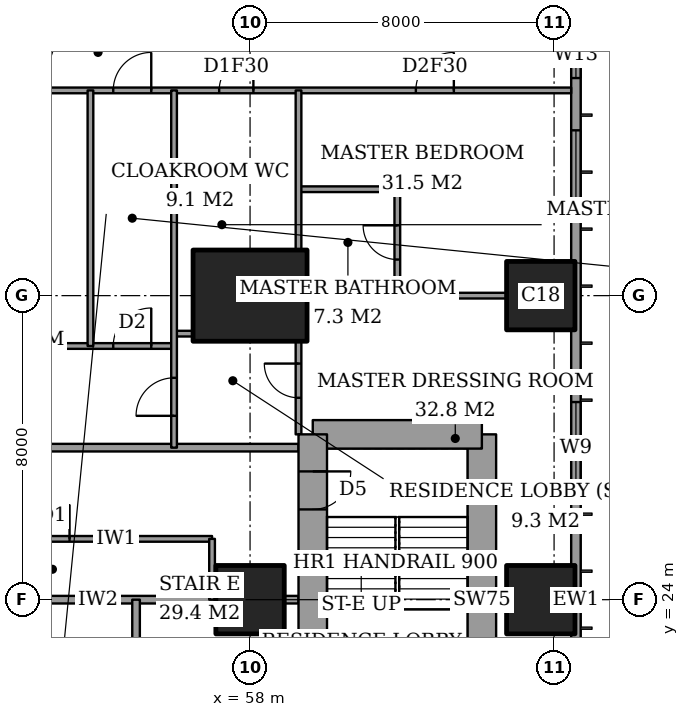
"""IFC4 building model, lengths in metres.
Left out: names, types, materials, properties, quantities, classifications, styles, units other than length and angle.
Written with IfcOpenShell. Run it as: python <this file> out.ifc"""

import sys

from ifc_helpers import new_model, si_unit, direction, frame, frame_2d, origin, origin_2d, place, context, subcontext, project, spatial, rectangle, extrude, element, fill, save


model = new_model("IFC4")
c1 = context("Model", 3, precision=1e-05, world=origin(), true_north=direction((0.0, 1.0)))
c2 = subcontext(c1, "Body", "Model", "MODEL_VIEW")
j1 = project(units=[si_unit("LENGTHUNIT", "METRE"), si_unit("PLANEANGLEUNIT", "RADIAN")], contexts=[c1])
p1 = place(None, origin())
s1 = spatial("IfcSite", under=j1, at=p1, CompositionType="ELEMENT")
p2 = place(p1, origin())
s2 = spatial("IfcBuilding", under=s1, at=p2, CompositionType="ELEMENT")
p3 = place(p2, frame((0.0, 0.0, 196.6)))
s3 = spatial("IfcBuildingStorey", under=s2, at=p3, CompositionType="ELEMENT", Elevation=196.6)
p4 = place(p3, frame((58.0, 24.0, 0.0), z_axis=(0.0, 0.0, 1.0), x_axis=(1.0, 0.0, 0.0)))
e1 = element("IfcColumn", 1, at=p4, inside=s3, PredefinedType="COLUMN", context=c2, shape_type="SweptSolid", body=[
    extrude(rectangle(XDim=1.8, YDim=1.8, at=origin_2d()), origin(), (0.0, 0.0, 1.0), 3.6),
])
p5 = place(p3, frame((58.0, 32.0, 0.0), z_axis=(0.0, 0.0, 1.0), x_axis=(1.0, 0.0, 0.0)))
e2 = element("IfcColumn", 2, at=p5, inside=s3, PredefinedType="COLUMN", context=c2, shape_type="SweptSolid", body=[
    extrude(rectangle(XDim=3.0, YDim=2.4, at=origin_2d()), origin(), (0.0, 0.0, 1.0), 3.6),
])
for number, where, z_axis, x_axis in (
    (3, (65.65, 24.0, 0.0), (0.0, 0.0, 1.0), (1.0, 0.0, 0.0)),
    (4, (65.65, 32.0, 0.0), (0.0, 0.0, 1.0), (1.0, 0.0, 0.0)),
):
    element("IfcColumn", number, at=place(p3, frame(where, z_axis=z_axis, x_axis=x_axis)), inside=s3, PredefinedType="COLUMN", context=c2, shape_type="SweptSolid", body=[
        extrude(rectangle(XDim=1.8, YDim=1.8, at=origin_2d()), origin(), (0.0, 0.0, 1.0), 3.6),
    ])
p6 = place(p3, frame((64.1, 19.65, 0.0), z_axis=(0.0, 0.0, 1.0), x_axis=(0.0, 1.0, 0.0)))
e5 = element("IfcWall", 5, at=p6, inside=s3, PredefinedType="SHEAR", context=c2, shape_type="SweptSolid", body=[
    extrude(rectangle(XDim=8.7, YDim=0.75, at=frame_2d((4.35, 0.0))), origin(), (0.0, 0.0, 1.0), 3.6),
])
p7 = place(p3, frame((64.1, 28.35, 0.0), z_axis=(0.0, 0.0, 1.0), x_axis=(-1.0, 0.0, 0.0)))
e6 = element("IfcWall", 6, at=p7, inside=s3, PredefinedType="SHEAR", context=c2, shape_type="SweptSolid", body=[
    extrude(rectangle(XDim=4.45, YDim=0.75, at=frame_2d((2.225, 0.0))), origin(), (0.0, 0.0, 1.0), 3.6),
])
p8 = place(p3, frame((59.65, 28.35, 0.0), z_axis=(0.0, 0.0, 1.0), x_axis=(0.0, -1.0, 0.0)))
e7 = element("IfcWall", 7, at=p8, inside=s3, PredefinedType="SHEAR", context=c2, shape_type="SweptSolid", body=[
    extrude(rectangle(XDim=8.7, YDim=0.75, at=frame_2d((4.35, 0.0))), origin(), (0.0, 0.0, 1.0), 3.6),
])
p9 = place(p8, frame((0.975, 0.0, 0.0)))
e8 = element("IfcOpeningElement", 8, at=p9, cuts=e7, PredefinedType="OPENING", context=c2, shape_type="SweptSolid", body=[
    extrude(rectangle(XDim=1.0, YDim=2.1, at=frame_2d((0.5, 1.05))), frame((0.0, 0.385, 0.0), z_axis=(0.0, -1.0, 0.0), x_axis=(1.0, 0.0, 0.0)), (0.0, 0.0, 1.0), 0.77),
])
p10 = place(p3, frame((66.575, 3.175, 0.0), z_axis=(0.0, 0.0, 1.0), x_axis=(0.0, 1.0, 0.0)))
e9 = element("IfcWall", 9, at=p10, inside=s3, PredefinedType="SOLIDWALL", context=c2, shape_type="SweptSolid", body=[
    extrude(rectangle(XDim=41.65, YDim=0.25, at=frame_2d((20.825, 0.0))), origin(), (0.0, 0.0, 1.0), 3.6),
])
p11 = place(p10, frame((0.825, 0.0, 0.2)))
e10 = element("IfcOpeningElement", 10, at=p11, cuts=e9, PredefinedType="OPENING", context=c2, shape_type="SweptSolid", body=[
    extrude(rectangle(XDim=2.4, YDim=2.4, at=frame_2d((1.2, 1.2))), frame((0.0, 0.135, 0.0), z_axis=(0.0, -1.0, 0.0), x_axis=(1.0, 0.0, 0.0)), (0.0, 0.0, 1.0), 0.27),
])
p12 = place(p10, frame((6.05, 0.0, 0.2)))
e11 = element("IfcOpeningElement", 11, at=p12, cuts=e9, PredefinedType="OPENING", context=c2, shape_type="SweptSolid", body=[
    extrude(rectangle(XDim=1.2, YDim=2.4, at=frame_2d((0.6, 1.2))), frame((0.0, 0.135, 0.0), z_axis=(0.0, -1.0, 0.0), x_axis=(1.0, 0.0, 0.0)), (0.0, 0.0, 1.0), 0.27),
])
p13 = place(p10, frame((8.475, 0.0, 0.2)))
e12 = element("IfcOpeningElement", 12, at=p13, cuts=e9, PredefinedType="OPENING", context=c2, shape_type="SweptSolid", body=[
    extrude(rectangle(XDim=2.4, YDim=2.4, at=frame_2d((1.2, 1.2))), frame((0.0, 0.135, 0.0), z_axis=(0.0, -1.0, 0.0), x_axis=(1.0, 0.0, 0.0)), (0.0, 0.0, 1.0), 0.27),
])
p14 = place(p10, frame((15.675, 0.0, 0.2)))
e13 = element("IfcOpeningElement", 13, at=p14, cuts=e9, PredefinedType="OPENING", context=c2, shape_type="SweptSolid", body=[
    extrude(rectangle(XDim=2.4, YDim=2.4, at=frame_2d((1.2, 1.2))), frame((0.0, 0.135, 0.0), z_axis=(0.0, -1.0, 0.0), x_axis=(1.0, 0.0, 0.0)), (0.0, 0.0, 1.0), 0.27),
])
p15 = place(p10, frame((23.625, 0.0, 0.2)))
e14 = element("IfcOpeningElement", 14, at=p15, cuts=e9, PredefinedType="OPENING", context=c2, shape_type="SweptSolid", body=[
    extrude(rectangle(XDim=2.4, YDim=2.4, at=frame_2d((1.2, 1.2))), frame((0.0, 0.135, 0.0), z_axis=(0.0, -1.0, 0.0), x_axis=(1.0, 0.0, 0.0)), (0.0, 0.0, 1.0), 0.27),
])
p16 = place(p10, frame((30.775, 0.0, 0.2)))
e15 = element("IfcOpeningElement", 15, at=p16, cuts=e9, PredefinedType="OPENING", context=c2, shape_type="SweptSolid", body=[
    extrude(rectangle(XDim=2.4, YDim=2.4, at=frame_2d((1.2, 1.2))), frame((0.0, 0.135, 0.0), z_axis=(0.0, -1.0, 0.0), x_axis=(1.0, 0.0, 0.0)), (0.0, 0.0, 1.0), 0.27),
])
p17 = place(p10, frame((34.55, 0.0, 0.2)))
e16 = element("IfcOpeningElement", 16, at=p17, cuts=e9, PredefinedType="OPENING", context=c2, shape_type="SweptSolid", body=[
    extrude(rectangle(XDim=1.2, YDim=2.4, at=frame_2d((0.6, 1.2))), frame((0.0, 0.135, 0.0), z_axis=(0.0, -1.0, 0.0), x_axis=(1.0, 0.0, 0.0)), (0.0, 0.0, 1.0), 0.27),
])
p18 = place(p10, frame((38.425, 0.0, 0.2)))
e17 = element("IfcOpeningElement", 17, at=p18, cuts=e9, PredefinedType="OPENING", context=c2, shape_type="SweptSolid", body=[
    extrude(rectangle(XDim=2.4, YDim=2.4, at=frame_2d((1.2, 1.2))), frame((0.0, 0.135, 0.0), z_axis=(0.0, -1.0, 0.0), x_axis=(1.0, 0.0, 0.0)), (0.0, 0.0, 1.0), 0.27),
])
p19 = place(p3, frame((50.9, 24.0, 0.0), z_axis=(0.0, 0.0, 1.0), x_axis=(1.0, 0.0, 0.0)))
e18 = element("IfcWall", 18, at=p19, inside=s3, PredefinedType="PARTITIONING", context=c2, shape_type="SweptSolid", body=[
    extrude(rectangle(XDim=6.2, YDim=0.2, at=frame_2d((3.1, 0.0))), origin(), (0.0, 0.0, 1.0), 3.35),
])
p20 = place(p3, frame((58.9, 24.0, 0.0), z_axis=(0.0, 0.0, 1.0), x_axis=(1.0, 0.0, 0.0)))
e19 = element("IfcWall", 19, at=p20, inside=s3, PredefinedType="PARTITIONING", context=c2, shape_type="SweptSolid", body=[
    extrude(rectangle(XDim=0.375, YDim=0.2, at=frame_2d((0.188, 0.0))), origin(), (0.0, 0.0, 1.0), 3.35),
])
p21 = place(p3, frame((48.6, 25.6, 0.0), z_axis=(0.0, 0.0, 1.0), x_axis=(1.0, 0.0, 0.0)))
e20 = element("IfcWall", 20, at=p21, inside=s3, PredefinedType="PARTITIONING", context=c2, shape_type="SweptSolid", body=[
    extrude(rectangle(XDim=8.4, YDim=0.15, at=frame_2d((4.2, 0.0))), origin(), (0.0, 0.0, 1.0), 3.35),
])
p22 = place(p21, frame((3.75, 0.0, 0.0)))
e21 = element("IfcOpeningElement", 21, at=p22, cuts=e20, PredefinedType="OPENING", context=c2, shape_type="SweptSolid", body=[
    extrude(rectangle(XDim=0.9, YDim=2.1, at=frame_2d((0.45, 1.05))), frame((0.0, 0.085, 0.0), z_axis=(0.0, -1.0, 0.0), x_axis=(1.0, 0.0, 0.0)), (0.0, 0.0, 1.0), 0.17),
])
p23 = place(p3, frame((42.0, 28.0, 0.0), z_axis=(0.0, 0.0, 1.0), x_axis=(1.0, 0.0, 0.0)))
e22 = element("IfcWall", 22, at=p23, inside=s3, PredefinedType="PARTITIONING", context=c2, shape_type="SweptSolid", body=[
    extrude(rectangle(XDim=17.275, YDim=0.2, at=frame_2d((8.637, 0.0))), origin(), (0.0, 0.0, 1.0), 3.35),
])
p24 = place(p23, frame((9.4, 0.0, 0.0)))
e23 = element("IfcOpeningElement", 23, at=p24, cuts=e22, PredefinedType="OPENING", context=c2, shape_type="SweptSolid", body=[
    extrude(rectangle(XDim=1.2, YDim=2.4, at=frame_2d((0.6, 1.2))), frame((0.0, 0.11, 0.0), z_axis=(0.0, -1.0, 0.0), x_axis=(1.0, 0.0, 0.0)), (0.0, 0.0, 1.0), 0.22),
])
p25 = place(p3, frame((51.6, 30.675, 0.0), z_axis=(0.0, 0.0, 1.0), x_axis=(1.0, 0.0, 0.0)))
e24 = element("IfcWall", 24, at=p25, inside=s3, PredefinedType="PARTITIONING", context=c2, shape_type="SweptSolid", body=[
    extrude(rectangle(XDim=4.4, YDim=0.15, at=frame_2d((2.2, 0.0))), origin(), (0.0, 0.0, 1.0), 3.35),
])
p26 = place(p25, frame((2.8, 0.0, 0.0)))
e25 = element("IfcOpeningElement", 25, at=p26, cuts=e24, PredefinedType="OPENING", context=c2, shape_type="SweptSolid", body=[
    extrude(rectangle(XDim=1.0, YDim=2.1, at=frame_2d((0.5, 1.05))), frame((0.0, 0.085, 0.0), z_axis=(0.0, -1.0, 0.0), x_axis=(1.0, 0.0, 0.0)), (0.0, 0.0, 1.0), 0.17),
])
p27 = place(p3, frame((56.0, 31.0, 0.0), z_axis=(0.0, 0.0, 1.0), x_axis=(1.0, 0.0, 0.0)))
e26 = element("IfcWall", 26, at=p27, inside=s3, PredefinedType="PARTITIONING", context=c2, shape_type="SweptSolid", body=[
    extrude(rectangle(XDim=0.5, YDim=0.15, at=frame_2d((0.25, 0.0))), origin(), (0.0, 0.0, 1.0), 3.35),
])
p28 = place(p3, frame((59.5, 32.0, 0.0), z_axis=(0.0, 0.0, 1.0), x_axis=(1.0, 0.0, 0.0)))
e27 = element("IfcWall", 27, at=p28, inside=s3, PredefinedType="PARTITIONING", context=c2, shape_type="SweptSolid", body=[
    extrude(rectangle(XDim=5.25, YDim=0.15, at=frame_2d((2.625, 0.0))), origin(), (0.0, 0.0, 1.0), 3.35),
])
p29 = place(p3, frame((59.275, 34.8, 0.0), z_axis=(0.0, 0.0, 1.0), x_axis=(1.0, 0.0, 0.0)))
e28 = element("IfcWall", 28, at=p29, inside=s3, PredefinedType="PARTITIONING", context=c2, shape_type="SweptSolid", body=[
    extrude(rectangle(XDim=2.6, YDim=0.15, at=frame_2d((1.3, 0.0))), origin(), (0.0, 0.0, 1.0), 3.35),
])
p30 = place(p3, frame((41.439, 37.4, 0.0), z_axis=(0.0, 0.0, 1.0), x_axis=(1.0, 0.0, 0.0)))
e29 = element("IfcWall", 29, at=p30, inside=s3, PredefinedType="PARTITIONING", context=c2, shape_type="SweptSolid", body=[
    extrude(rectangle(XDim=25.011, YDim=0.15, at=frame_2d((12.505, 0.0))), origin(), (0.0, 0.0, 1.0), 3.35),
])
p31 = place(p30, frame((12.961, 0.0, 0.0)))
e30 = element("IfcOpeningElement", 30, at=p31, cuts=e29, PredefinedType="OPENING", context=c2, shape_type="SweptSolid", body=[
    extrude(rectangle(XDim=1.0, YDim=2.1, at=frame_2d((0.5, 1.05))), frame((0.0, 0.085, 0.0), z_axis=(0.0, -1.0, 0.0), x_axis=(1.0, 0.0, 0.0)), (0.0, 0.0, 1.0), 0.17),
])
p32 = place(p30, frame((20.924, 0.0, 0.0)))
e31 = element("IfcOpeningElement", 31, at=p32, cuts=e29, PredefinedType="OPENING", context=c2, shape_type="SweptSolid", body=[
    extrude(rectangle(XDim=1.0, YDim=2.1, at=frame_2d((0.5, 1.05))), frame((0.0, 0.085, 0.0), z_axis=(0.0, -1.0, 0.0), x_axis=(1.0, 0.0, 0.0)), (0.0, 0.0, 1.0), 0.17),
])
p33 = place(p30, frame((15.749, 0.0, 0.0)))
e32 = element("IfcOpeningElement", 32, at=p33, cuts=e29, PredefinedType="OPENING", context=c2, shape_type="SweptSolid", body=[
    extrude(rectangle(XDim=0.9, YDim=2.1, at=frame_2d((0.45, 1.05))), frame((0.0, 0.085, 0.0), z_axis=(0.0, -1.0, 0.0), x_axis=(1.0, 0.0, 0.0)), (0.0, 0.0, 1.0), 0.17),
])
p34 = place(p30, frame((8.961, 0.0, 0.0)))
e33 = element("IfcOpeningElement", 33, at=p34, cuts=e29, PredefinedType="OPENING", context=c2, shape_type="SweptSolid", body=[
    extrude(rectangle(XDim=1.0, YDim=2.1, at=frame_2d((0.5, 1.05))), frame((0.0, 0.085, 0.0), z_axis=(0.0, -1.0, 0.0), x_axis=(1.0, 0.0, 0.0)), (0.0, 0.0, 1.0), 0.17),
])
p35 = place(p30, frame((2.836, 0.0, 0.0)))
e34 = element("IfcOpeningElement", 34, at=p35, cuts=e29, PredefinedType="OPENING", context=c2, shape_type="SweptSolid", body=[
    extrude(rectangle(XDim=1.0, YDim=2.1, at=frame_2d((0.5, 1.05))), frame((0.0, 0.085, 0.0), z_axis=(0.0, -1.0, 0.0), x_axis=(1.0, 0.0, 0.0)), (0.0, 0.0, 1.0), 0.17),
])
p36 = place(p3, frame((53.8, 30.675, 0.0), z_axis=(0.0, 0.0, 1.0), x_axis=(0.0, 1.0, 0.0)))
e35 = element("IfcWall", 35, at=p36, inside=s3, PredefinedType="PARTITIONING", context=c2, shape_type="SweptSolid", body=[
    extrude(rectangle(XDim=6.725, YDim=0.15, at=frame_2d((3.362, 0.0))), origin(), (0.0, 0.0, 1.0), 3.35),
])
p37 = place(p3, frame((55.0, 21.6, 0.0), z_axis=(0.0, 0.0, 1.0), x_axis=(0.0, 1.0, 0.0)))
e36 = element("IfcWall", 36, at=p37, inside=s3, PredefinedType="PARTITIONING", context=c2, shape_type="SweptSolid", body=[
    extrude(rectangle(XDim=2.4, YDim=0.2, at=frame_2d((1.2, 0.0))), origin(), (0.0, 0.0, 1.0), 3.35),
])
p38 = place(p3, frame((56.0, 28.0, 0.0), z_axis=(0.0, 0.0, 1.0), x_axis=(0.0, 1.0, 0.0)))
e37 = element("IfcWall", 37, at=p38, inside=s3, PredefinedType="PARTITIONING", context=c2, shape_type="SweptSolid", body=[
    extrude(rectangle(XDim=9.4, YDim=0.15, at=frame_2d((4.7, 0.0))), origin(), (0.0, 0.0, 1.0), 3.35),
])
p39 = place(p38, frame((0.837, 0.0, 0.0)))
e38 = element("IfcOpeningElement", 38, at=p39, cuts=e37, PredefinedType="OPENING", context=c2, shape_type="SweptSolid", body=[
    extrude(rectangle(XDim=1.0, YDim=2.1, at=frame_2d((0.5, 1.05))), frame((0.0, 0.085, 0.0), z_axis=(0.0, -1.0, 0.0), x_axis=(1.0, 0.0, 0.0)), (0.0, 0.0, 1.0), 0.17),
])
p40 = place(p3, frame((57.0, 24.0, 0.0), z_axis=(0.0, 0.0, 1.0), x_axis=(0.0, 1.0, 0.0)))
e39 = element("IfcWall", 39, at=p40, inside=s3, PredefinedType="PARTITIONING", context=c2, shape_type="SweptSolid", body=[
    extrude(rectangle(XDim=1.6, YDim=0.15, at=frame_2d((0.8, 0.0))), origin(), (0.0, 0.0, 1.0), 3.35),
])
p41 = place(p3, frame((59.275, 28.35, 0.0), z_axis=(0.0, 0.0, 1.0), x_axis=(0.0, 1.0, 0.0)))
e40 = element("IfcWall", 40, at=p41, inside=s3, PredefinedType="PARTITIONING", context=c2, shape_type="SweptSolid", body=[
    extrude(rectangle(XDim=2.45, YDim=0.15, at=frame_2d((1.225, 0.0))), origin(), (0.0, 0.0, 1.0), 3.35),
])
p42 = place(p41, frame((0.962, 0.0, 0.0)))
e41 = element("IfcOpeningElement", 41, at=p42, cuts=e40, PredefinedType="OPENING", context=c2, shape_type="SweptSolid", body=[
    extrude(rectangle(XDim=0.9, YDim=2.1, at=frame_2d((0.45, 1.05))), frame((0.0, 0.085, 0.0), z_axis=(0.0, -1.0, 0.0), x_axis=(1.0, 0.0, 0.0)), (0.0, 0.0, 1.0), 0.17),
])
p43 = place(p3, frame((59.275, 33.2, 0.0), z_axis=(0.0, 0.0, 1.0), x_axis=(0.0, 1.0, 0.0)))
e42 = element("IfcWall", 42, at=p43, inside=s3, PredefinedType="PARTITIONING", context=c2, shape_type="SweptSolid", body=[
    extrude(rectangle(XDim=4.2, YDim=0.15, at=frame_2d((2.1, 0.0))), origin(), (0.0, 0.0, 1.0), 3.35),
])
p44 = place(p3, frame((61.875, 32.0, 0.0), z_axis=(0.0, 0.0, 1.0), x_axis=(0.0, 1.0, 0.0)))
e43 = element("IfcWall", 43, at=p44, inside=s3, PredefinedType="PARTITIONING", context=c2, shape_type="SweptSolid", body=[
    extrude(rectangle(XDim=2.8, YDim=0.15, at=frame_2d((1.4, 0.0))), origin(), (0.0, 0.0, 1.0), 3.35),
])
p45 = place(p44, frame((0.95, 0.0, 0.0)))
e44 = element("IfcOpeningElement", 44, at=p45, cuts=e43, PredefinedType="OPENING", context=c2, shape_type="SweptSolid", body=[
    extrude(rectangle(XDim=0.9, YDim=2.1, at=frame_2d((0.45, 1.05))), frame((0.0, 0.085, 0.0), z_axis=(0.0, -1.0, 0.0), x_axis=(1.0, 0.0, 0.0)), (0.0, 0.0, 1.0), 0.17),
])
p46 = place(p15, origin())
e45 = element("IfcWindow", 45, at=p46, inside=s3, PartitioningType="SINGLE_PANEL", PredefinedType="WINDOW", context=c2, shape_type="SweptSolid", body=[
    extrude(rectangle(XDim=2.4, YDim=2.4, at=frame_2d((1.2, 1.2))), frame((0.0, 0.03, 0.0), z_axis=(0.0, -1.0, 0.0), x_axis=(1.0, 0.0, 0.0)), (0.0, 0.0, 1.0), 0.06),
])
fill(e14, e45)
p47 = place(p16, origin())
e46 = element("IfcWindow", 46, at=p47, inside=s3, PartitioningType="SINGLE_PANEL", PredefinedType="WINDOW", context=c2, shape_type="SweptSolid", body=[
    extrude(rectangle(XDim=2.4, YDim=2.4, at=frame_2d((1.2, 1.2))), frame((0.0, 0.03, 0.0), z_axis=(0.0, -1.0, 0.0), x_axis=(1.0, 0.0, 0.0)), (0.0, 0.0, 1.0), 0.06),
])
fill(e15, e46)
p48 = place(p17, origin())
e47 = element("IfcWindow", 47, at=p48, inside=s3, PartitioningType="SINGLE_PANEL", PredefinedType="WINDOW", context=c2, shape_type="SweptSolid", body=[
    extrude(rectangle(XDim=1.2, YDim=2.4, at=frame_2d((0.6, 1.2))), frame((0.0, 0.03, 0.0), z_axis=(0.0, -1.0, 0.0), x_axis=(1.0, 0.0, 0.0)), (0.0, 0.0, 1.0), 0.06),
])
fill(e16, e47)
p49 = place(p31, origin())
e48 = element("IfcDoor", 48, at=p49, inside=s3, OperationType="SINGLE_SWING_LEFT", PredefinedType="DOOR", context=c2, shape_type="SweptSolid", body=[
    extrude(rectangle(XDim=1.0, YDim=2.1, at=frame_2d((0.5, 1.05))), frame((0.0, 0.025, 0.0), z_axis=(0.0, -1.0, 0.0), x_axis=(1.0, 0.0, 0.0)), (0.0, 0.0, 1.0), 0.05),
])
fill(e30, e48)
p50 = place(p45, origin())
e49 = element("IfcDoor", 49, at=p50, inside=s3, OperationType="SINGLE_SWING_LEFT", PredefinedType="DOOR", context=c2, shape_type="SweptSolid", body=[
    extrude(rectangle(XDim=0.9, YDim=2.1, at=frame_2d((0.45, 1.05))), frame((0.0, 0.025, 0.0), z_axis=(0.0, -1.0, 0.0), x_axis=(1.0, 0.0, 0.0)), (0.0, 0.0, 1.0), 0.05),
])
fill(e44, e49)
p51 = place(p32, origin())
e50 = element("IfcDoor", 50, at=p51, inside=s3, OperationType="SINGLE_SWING_LEFT", PredefinedType="DOOR", context=c2, shape_type="SweptSolid", body=[
    extrude(rectangle(XDim=1.0, YDim=2.1, at=frame_2d((0.5, 1.05))), frame((0.0, 0.025, 0.0), z_axis=(0.0, -1.0, 0.0), x_axis=(1.0, 0.0, 0.0)), (0.0, 0.0, 1.0), 0.05),
])
fill(e31, e50)
p52 = place(p42, origin())
e51 = element("IfcDoor", 51, at=p52, inside=s3, OperationType="SINGLE_SWING_LEFT", PredefinedType="DOOR", context=c2, shape_type="SweptSolid", body=[
    extrude(rectangle(XDim=0.9, YDim=2.1, at=frame_2d((0.45, 1.05))), frame((0.0, 0.025, 0.0), z_axis=(0.0, -1.0, 0.0), x_axis=(1.0, 0.0, 0.0)), (0.0, 0.0, 1.0), 0.05),
])
fill(e41, e51)
p53 = place(p33, origin())
e52 = element("IfcDoor", 52, at=p53, inside=s3, OperationType="SINGLE_SWING_LEFT", PredefinedType="DOOR", context=c2, shape_type="SweptSolid", body=[
    extrude(rectangle(XDim=0.9, YDim=2.1, at=frame_2d((0.45, 1.05))), frame((0.0, 0.025, 0.0), z_axis=(0.0, -1.0, 0.0), x_axis=(1.0, 0.0, 0.0)), (0.0, 0.0, 1.0), 0.05),
])
fill(e32, e52)
p54 = place(p39, origin())
e53 = element("IfcDoor", 53, at=p54, inside=s3, OperationType="SINGLE_SWING_RIGHT", PredefinedType="DOOR", context=c2, shape_type="SweptSolid", body=[
    extrude(rectangle(XDim=1.0, YDim=2.1, at=frame_2d((0.5, 1.05))), frame((0.0, 0.025, 0.0), z_axis=(0.0, -1.0, 0.0), x_axis=(1.0, 0.0, 0.0)), (0.0, 0.0, 1.0), 0.05),
])
fill(e38, e53)
p55 = place(p26, origin())
e54 = element("IfcDoor", 54, at=p55, inside=s3, OperationType="SINGLE_SWING_LEFT", PredefinedType="DOOR", context=c2, shape_type="SweptSolid", body=[
    extrude(rectangle(XDim=1.0, YDim=2.1, at=frame_2d((0.5, 1.05))), frame((0.0, 0.025, 0.0), z_axis=(0.0, -1.0, 0.0), x_axis=(1.0, 0.0, 0.0)), (0.0, 0.0, 1.0), 0.05),
])
fill(e25, e54)
p56 = place(p22, origin())
e55 = element("IfcDoor", 55, at=p56, inside=s3, OperationType="SINGLE_SWING_LEFT", PredefinedType="DOOR", context=c2, shape_type="SweptSolid", body=[
    extrude(rectangle(XDim=0.9, YDim=2.1, at=frame_2d((0.45, 1.05))), frame((0.0, 0.025, 0.0), z_axis=(0.0, -1.0, 0.0), x_axis=(1.0, 0.0, 0.0)), (0.0, 0.0, 1.0), 0.05),
])
fill(e21, e55)
p57 = place(p9, origin())
e56 = element("IfcDoor", 56, at=p57, inside=s3, OperationType="SINGLE_SWING_RIGHT", PredefinedType="DOOR", context=c2, shape_type="SweptSolid", body=[
    extrude(rectangle(XDim=1.0, YDim=2.1, at=frame_2d((0.5, 1.05))), frame((0.0, 0.025, 0.0), z_axis=(0.0, -1.0, 0.0), x_axis=(1.0, 0.0, 0.0)), (0.0, 0.0, 1.0), 0.05),
])
fill(e8, e56)
save(model, sys.argv[1])
